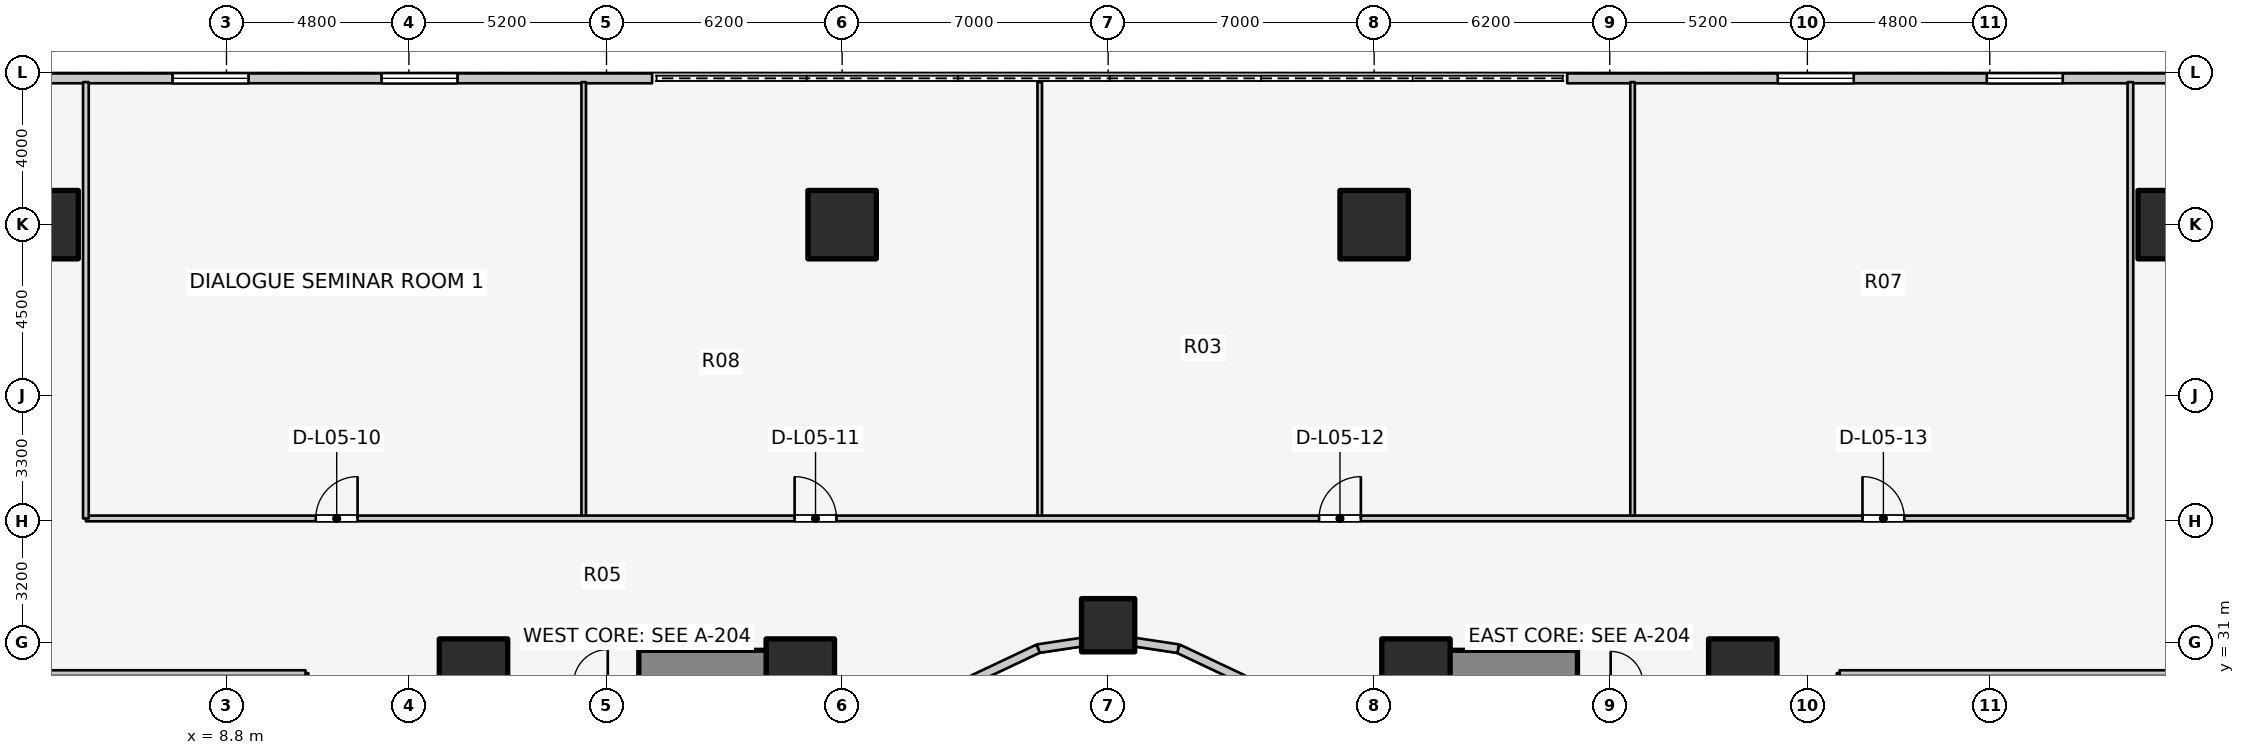
"""IFC4 building model, lengths in metres.
Left out: names, types, materials, properties, quantities, classifications, styles, units other than length and angle.
Written with IfcOpenShell. Run it as: python <this file> out.ifc"""

import sys

from ifc_helpers import new_model, si_unit, direction, frame, frame_2d, origin, origin_2d, place, context, subcontext, project, spatial, rectangle, extrude, element, fill, save


model = new_model("IFC4")
c1 = context("Model", 3, precision=1e-05, world=origin(), true_north=direction((0.0, 1.0)))
c2 = subcontext(c1, "Body", "Model", "MODEL_VIEW")
j1 = project(units=[si_unit("LENGTHUNIT", "METRE"), si_unit("PLANEANGLEUNIT", "RADIAN")], contexts=[c1])
p1 = place(None, origin())
s1 = spatial("IfcSite", under=j1, at=p1, CompositionType="ELEMENT")
p2 = place(p1, origin())
s2 = spatial("IfcBuilding", under=s1, at=p2, CompositionType="ELEMENT")
p3 = place(p2, frame((0.0, 0.0, 18.4)))
s3 = spatial("IfcBuildingStorey", under=s2, at=p3, CompositionType="ELEMENT", Elevation=18.4)
for number, where, z_axis, x_axis in (
    (1, (19.65, 30.35, 0.0), (0.0, 0.0, 1.0), (1.0, 0.0, 0.0)),
    (2, (39.85, 30.35, 0.0), (0.0, 0.0, 1.0), (1.0, 0.0, 0.0)),
):
    element("IfcWall", number, at=place(p3, frame(where, z_axis=z_axis, x_axis=x_axis)), inside=s3, PredefinedType="SHEAR", context=c2, shape_type="SweptSolid", body=[
        extrude(rectangle(XDim=4.5, YDim=0.9, at=frame_2d((2.25, 0.0))), origin(), (0.0, 0.0, 1.0), 4.6),
    ])
for number, where, z_axis, x_axis in (
    (3, (23.9, 30.2, 0.0), (0.0, 0.0, 1.0), (1.0, 0.0, 0.0)),
    (4, (15.3, 30.2, 0.0), (0.0, 0.0, 1.0), (1.0, 0.0, 0.0)),
    (5, (48.7, 30.2, 0.0), (0.0, 0.0, 1.0), (1.0, 0.0, 0.0)),
    (6, (40.1, 30.2, 0.0), (0.0, 0.0, 1.0), (1.0, 0.0, 0.0)),
    (7, (60.0, 42.0, 0.0), (0.0, 0.0, 1.0), (1.0, 0.0, 0.0)),
    (8, (39.0, 42.0, 0.0), (0.0, 0.0, 1.0), (1.0, 0.0, 0.0)),
    (9, (25.0, 42.0, 0.0), (0.0, 0.0, 1.0), (1.0, 0.0, 0.0)),
    (10, (4.0, 42.0, 0.0), (0.0, 0.0, 1.0), (1.0, 0.0, 0.0)),
):
    element("IfcColumn", number, at=place(p3, frame(where, z_axis=z_axis, x_axis=x_axis)), inside=s3, PredefinedType="COLUMN", context=c2, shape_type="SweptSolid", body=[
        extrude(rectangle(XDim=1.8, YDim=1.8, at=origin_2d()), origin(), (0.0, 0.0, 1.0), 4.6),
    ])
p4 = place(p3, frame((32.0, 31.46, 0.0), z_axis=(0.0, 0.0, 1.0), x_axis=(1.0, 0.0, 0.0)))
e11 = element("IfcColumn", 11, at=p4, inside=s3, PredefinedType="COLUMN", context=c2, shape_type="SweptSolid", body=[
    extrude(rectangle(XDim=1.4, YDim=1.4, at=origin_2d()), origin(), (0.0, 0.0, 1.0), 4.6),
])
p5 = place(p3, frame((63.72, 45.85, 0.0), z_axis=(0.0, 0.0, 1.0), x_axis=(-1.0, 0.0, 0.0)))
e12 = element("IfcWall", 12, at=p5, inside=s3, PredefinedType="STANDARD", context=c2, shape_type="SweptSolid", body=[
    extrude(rectangle(XDim=19.64, YDim=0.26, at=frame_2d((9.82, 0.0))), origin(), (0.0, 0.0, 1.0), 4.28),
])
p6 = place(p5, frame((6.6, 0.0, 2.2)))
e13 = element("IfcOpeningElement", 13, at=p6, cuts=e12, PredefinedType="OPENING", context=c2, shape_type="SweptSolid", body=[
    extrude(rectangle(XDim=2.0, YDim=1.1, at=frame_2d((1.0, 0.55))), frame((0.0, 0.14, 0.0), z_axis=(0.0, -1.0, 0.0), x_axis=(1.0, 0.0, 0.0)), (0.0, 0.0, 1.0), 0.28),
])
p7 = place(p5, frame((12.1, 0.0, 2.2)))
e14 = element("IfcOpeningElement", 14, at=p7, cuts=e12, PredefinedType="OPENING", context=c2, shape_type="SweptSolid", body=[
    extrude(rectangle(XDim=2.0, YDim=1.1, at=frame_2d((1.0, 0.55))), frame((0.0, 0.14, 0.0), z_axis=(0.0, -1.0, 0.0), x_axis=(1.0, 0.0, 0.0)), (0.0, 0.0, 1.0), 0.28),
])
p8 = place(p3, frame((20.0, 45.85, 0.0), z_axis=(0.0, 0.0, 1.0), x_axis=(-1.0, 0.0, 0.0)))
e15 = element("IfcWall", 15, at=p8, inside=s3, PredefinedType="STANDARD", context=c2, shape_type="SweptSolid", body=[
    extrude(rectangle(XDim=19.72, YDim=0.26, at=frame_2d((9.86, 0.0))), origin(), (0.0, 0.0, 1.0), 4.28),
])
p9 = place(p8, frame((5.12, 0.0, 2.2)))
e16 = element("IfcOpeningElement", 16, at=p9, cuts=e15, PredefinedType="OPENING", context=c2, shape_type="SweptSolid", body=[
    extrude(rectangle(XDim=2.0, YDim=1.1, at=frame_2d((1.0, 0.55))), frame((0.0, 0.14, 0.0), z_axis=(0.0, -1.0, 0.0), x_axis=(1.0, 0.0, 0.0)), (0.0, 0.0, 1.0), 0.28),
])
p10 = place(p8, frame((10.62, 0.0, 2.2)))
e17 = element("IfcOpeningElement", 17, at=p10, cuts=e15, PredefinedType="OPENING", context=c2, shape_type="SweptSolid", body=[
    extrude(rectangle(XDim=2.0, YDim=1.1, at=frame_2d((1.0, 0.55))), frame((0.0, 0.14, 0.0), z_axis=(0.0, -1.0, 0.0), x_axis=(1.0, 0.0, 0.0)), (0.0, 0.0, 1.0), 0.28),
])
p11 = place(p3, frame((35.56, 30.032, 0.0), z_axis=(0.0, 0.0, 1.0), x_axis=(-0.904179699603, 0.427152280606, 0.0)))
e18 = element("IfcWall", 18, at=p11, inside=s3, PredefinedType="STANDARD", context=c2, shape_type="SweptSolid", body=[
    extrude(rectangle(XDim=1.899, YDim=0.23, at=frame_2d((0.95, 0.0))), origin(), (0.0, 0.0, 1.0), 3.28),
])
for number, where, z_axis, x_axis in (
    (19, (33.843, 30.843, 0.0), (0.0, 0.0, 1.0), (-0.989, 0.149, 0.0)),
    (20, (32.0, 31.12, 0.0), (0.0, 0.0, 1.0), (-0.989, -0.149, 0.0)),
):
    element("IfcWall", number, at=place(p3, frame(where, z_axis=z_axis, x_axis=x_axis)), inside=s3, PredefinedType="STANDARD", context=c2, shape_type="SweptSolid", body=[
        extrude(rectangle(XDim=1.864, YDim=0.23, at=frame_2d((0.932, 0.0))), origin(), (0.0, 0.0, 1.0), 3.28),
    ])
p12 = place(p3, frame((30.157, 30.843, 0.0), z_axis=(0.0, 0.0, 1.0), x_axis=(-0.904179699603, -0.427152280606, 0.0)))
e21 = element("IfcWall", 21, at=p12, inside=s3, PredefinedType="STANDARD", context=c2, shape_type="SweptSolid", body=[
    extrude(rectangle(XDim=1.899, YDim=0.23, at=frame_2d((0.95, 0.0))), origin(), (0.0, 0.0, 1.0), 3.28),
])
for number, where, z_axis, x_axis in (
    (22, (18.2, 34.32, 0.0), (0.0, 0.0, 1.0), (0.0, 1.0, 0.0)),
    (23, (30.2, 34.32, 0.0), (0.0, 0.0, 1.0), (0.0, 1.0, 0.0)),
    (24, (45.8, 34.32, 0.0), (0.0, 0.0, 1.0), (0.0, 1.0, 0.0)),
):
    element("IfcWall", number, at=place(p3, frame(where, z_axis=z_axis, x_axis=x_axis)), inside=s3, PredefinedType="MOVABLE", context=c2, shape_type="SweptSolid", body=[
        extrude(rectangle(XDim=11.43, YDim=0.12, at=frame_2d((5.715, 0.0))), origin(), (0.0, 0.0, 1.0), 3.3),
    ])
p13 = place(p3, frame((5.1, 34.27, 0.0), z_axis=(0.0, 0.0, 1.0), x_axis=(1.0, 0.0, 0.0)))
e25 = element("IfcWall", 25, at=p13, inside=s3, PredefinedType="PARTITIONING", context=c2, shape_type="SweptSolid", body=[
    extrude(rectangle(XDim=53.8, YDim=0.15, at=frame_2d((26.9, 0.0))), origin(), (0.0, 0.0, 1.0), 3.3),
])
p14 = place(p13, frame((6.05, 0.0, 0.0)))
e26 = element("IfcOpeningElement", 26, at=p14, cuts=e25, PredefinedType="OPENING", context=c2, shape_type="SweptSolid", body=[
    extrude(rectangle(XDim=1.1, YDim=2.1, at=frame_2d((0.55, 1.05))), frame((0.0, 0.085, 0.0), z_axis=(0.0, -1.0, 0.0), x_axis=(1.0, 0.0, 0.0)), (0.0, 0.0, 1.0), 0.17),
])
p15 = place(p13, frame((18.65, 0.0, 0.0)))
e27 = element("IfcOpeningElement", 27, at=p15, cuts=e25, PredefinedType="OPENING", context=c2, shape_type="SweptSolid", body=[
    extrude(rectangle(XDim=1.1, YDim=2.1, at=frame_2d((0.55, 1.05))), frame((0.0, 0.085, 0.0), z_axis=(0.0, -1.0, 0.0), x_axis=(1.0, 0.0, 0.0)), (0.0, 0.0, 1.0), 0.17),
])
p16 = place(p13, frame((32.45, 0.0, 0.0)))
e28 = element("IfcOpeningElement", 28, at=p16, cuts=e25, PredefinedType="OPENING", context=c2, shape_type="SweptSolid", body=[
    extrude(rectangle(XDim=1.1, YDim=2.1, at=frame_2d((0.55, 1.05))), frame((0.0, 0.085, 0.0), z_axis=(0.0, -1.0, 0.0), x_axis=(1.0, 0.0, 0.0)), (0.0, 0.0, 1.0), 0.17),
])
p17 = place(p13, frame((46.75, 0.0, 0.0)))
e29 = element("IfcOpeningElement", 29, at=p17, cuts=e25, PredefinedType="OPENING", context=c2, shape_type="SweptSolid", body=[
    extrude(rectangle(XDim=1.1, YDim=2.1, at=frame_2d((0.55, 1.05))), frame((0.0, 0.085, 0.0), z_axis=(0.0, -1.0, 0.0), x_axis=(1.0, 0.0, 0.0)), (0.0, 0.0, 1.0), 0.17),
])
for number, where, z_axis, x_axis in (
    (30, (5.1, 34.27, 0.0), (0.0, 0.0, 1.0), (0.0, 1.0, 0.0)),
    (31, (58.9, 34.27, 0.0), (0.0, 0.0, 1.0), (0.0, 1.0, 0.0)),
):
    element("IfcWall", number, at=place(p3, frame(where, z_axis=z_axis, x_axis=x_axis)), inside=s3, PredefinedType="PARTITIONING", context=c2, shape_type="SweptSolid", body=[
        extrude(rectangle(XDim=11.48, YDim=0.15, at=frame_2d((5.74, 0.0))), origin(), (0.0, 0.0, 1.0), 3.3),
    ])
p18 = place(p3, frame((51.25, 16.75, 0.0), z_axis=(0.0, 0.0, 1.0), x_axis=(0.0, 1.0, 0.0)))
e32 = element("IfcWall", 32, at=p18, inside=s3, PredefinedType="PARTITIONING", context=c2, shape_type="SweptSolid", body=[
    extrude(rectangle(XDim=13.45, YDim=0.15, at=frame_2d((6.725, 0.0))), origin(), (0.0, 0.0, 1.0), 4.255),
])
p19 = place(p18, frame((6.175, 0.0, 0.0)))
e33 = element("IfcOpeningElement", 33, at=p19, cuts=e32, PredefinedType="OPENING", context=c2, shape_type="SweptSolid", body=[
    extrude(rectangle(XDim=1.1, YDim=2.1, at=frame_2d((0.55, 1.05))), frame((0.0, 0.085, 0.0), z_axis=(0.0, -1.0, 0.0), x_axis=(1.0, 0.0, 0.0)), (0.0, 0.0, 1.0), 0.17),
])
p20 = place(p3, frame((51.25, 30.2, 0.0), z_axis=(0.0, 0.0, 1.0), x_axis=(1.0, 0.0, 0.0)))
e34 = element("IfcWall", 34, at=p20, inside=s3, PredefinedType="PARTITIONING", context=c2, shape_type="SweptSolid", body=[
    extrude(rectangle(XDim=12.53, YDim=0.15, at=frame_2d((6.265, 0.0))), origin(), (0.0, 0.0, 1.0), 3.3),
])
p21 = place(p3, frame((10.88, 19.12, 0.0), z_axis=(0.0, 0.0, 1.0), x_axis=(0.0, 1.0, 0.0)))
e35 = element("IfcWall", 35, at=p21, inside=s3, PredefinedType="PARTITIONING", context=c2, shape_type="SweptSolid", body=[
    extrude(rectangle(XDim=11.08, YDim=0.15, at=frame_2d((5.54, 0.0))), origin(), (0.0, 0.0, 1.0), 3.62),
])
p22 = place(p3, frame((0.25, 30.2, 0.0), z_axis=(0.0, 0.0, 1.0), x_axis=(1.0, 0.0, 0.0)))
e36 = element("IfcWall", 36, at=p22, inside=s3, PredefinedType="PARTITIONING", context=c2, shape_type="SweptSolid", body=[
    extrude(rectangle(XDim=10.63, YDim=0.15, at=frame_2d((5.315, 0.0))), origin(), (0.0, 0.0, 1.0), 3.3),
])
p23 = place(p6, origin())
e37 = element("IfcWindow", 37, at=p23, inside=s3, PartitioningType="SINGLE_PANEL", PredefinedType="WINDOW", context=c2, shape_type="SweptSolid", body=[
    extrude(rectangle(XDim=2.0, YDim=1.1, at=frame_2d((1.0, 0.55))), frame((0.0, 0.03, 0.0), z_axis=(0.0, -1.0, 0.0), x_axis=(1.0, 0.0, 0.0)), (0.0, 0.0, 1.0), 0.06),
])
fill(e13, e37)
p24 = place(p7, origin())
e38 = element("IfcWindow", 38, at=p24, inside=s3, PartitioningType="SINGLE_PANEL", PredefinedType="WINDOW", context=c2, shape_type="SweptSolid", body=[
    extrude(rectangle(XDim=2.0, YDim=1.1, at=frame_2d((1.0, 0.55))), frame((0.0, 0.03, 0.0), z_axis=(0.0, -1.0, 0.0), x_axis=(1.0, 0.0, 0.0)), (0.0, 0.0, 1.0), 0.06),
])
fill(e14, e38)
p25 = place(p9, origin())
e39 = element("IfcWindow", 39, at=p25, inside=s3, PartitioningType="SINGLE_PANEL", PredefinedType="WINDOW", context=c2, shape_type="SweptSolid", body=[
    extrude(rectangle(XDim=2.0, YDim=1.1, at=frame_2d((1.0, 0.55))), frame((0.0, 0.03, 0.0), z_axis=(0.0, -1.0, 0.0), x_axis=(1.0, 0.0, 0.0)), (0.0, 0.0, 1.0), 0.06),
])
fill(e16, e39)
p26 = place(p10, origin())
e40 = element("IfcWindow", 40, at=p26, inside=s3, PartitioningType="SINGLE_PANEL", PredefinedType="WINDOW", context=c2, shape_type="SweptSolid", body=[
    extrude(rectangle(XDim=2.0, YDim=1.1, at=frame_2d((1.0, 0.55))), frame((0.0, 0.03, 0.0), z_axis=(0.0, -1.0, 0.0), x_axis=(1.0, 0.0, 0.0)), (0.0, 0.0, 1.0), 0.06),
])
fill(e17, e40)
p27 = place(p14, origin())
e41 = element("IfcDoor", 41, at=p27, inside=s3, OperationType="SINGLE_SWING_RIGHT", PredefinedType="DOOR", context=c2, shape_type="SweptSolid", body=[
    extrude(rectangle(XDim=1.1, YDim=2.1, at=frame_2d((0.55, 1.05))), frame((0.0, 0.025, 0.0), z_axis=(0.0, -1.0, 0.0), x_axis=(1.0, 0.0, 0.0)), (0.0, 0.0, 1.0), 0.05),
])
fill(e26, e41)
p28 = place(p15, origin())
e42 = element("IfcDoor", 42, at=p28, inside=s3, OperationType="SINGLE_SWING_LEFT", PredefinedType="DOOR", context=c2, shape_type="SweptSolid", body=[
    extrude(rectangle(XDim=1.1, YDim=2.1, at=frame_2d((0.55, 1.05))), frame((0.0, 0.025, 0.0), z_axis=(0.0, -1.0, 0.0), x_axis=(1.0, 0.0, 0.0)), (0.0, 0.0, 1.0), 0.05),
])
fill(e27, e42)
p29 = place(p16, origin())
e43 = element("IfcDoor", 43, at=p29, inside=s3, OperationType="SINGLE_SWING_RIGHT", PredefinedType="DOOR", context=c2, shape_type="SweptSolid", body=[
    extrude(rectangle(XDim=1.1, YDim=2.1, at=frame_2d((0.55, 1.05))), frame((0.0, 0.025, 0.0), z_axis=(0.0, -1.0, 0.0), x_axis=(1.0, 0.0, 0.0)), (0.0, 0.0, 1.0), 0.05),
])
fill(e28, e43)
p30 = place(p17, origin())
e44 = element("IfcDoor", 44, at=p30, inside=s3, OperationType="SINGLE_SWING_LEFT", PredefinedType="DOOR", context=c2, shape_type="SweptSolid", body=[
    extrude(rectangle(XDim=1.1, YDim=2.1, at=frame_2d((0.55, 1.05))), frame((0.0, 0.025, 0.0), z_axis=(0.0, -1.0, 0.0), x_axis=(1.0, 0.0, 0.0)), (0.0, 0.0, 1.0), 0.05),
])
fill(e29, e44)
save(model, sys.argv[1])
